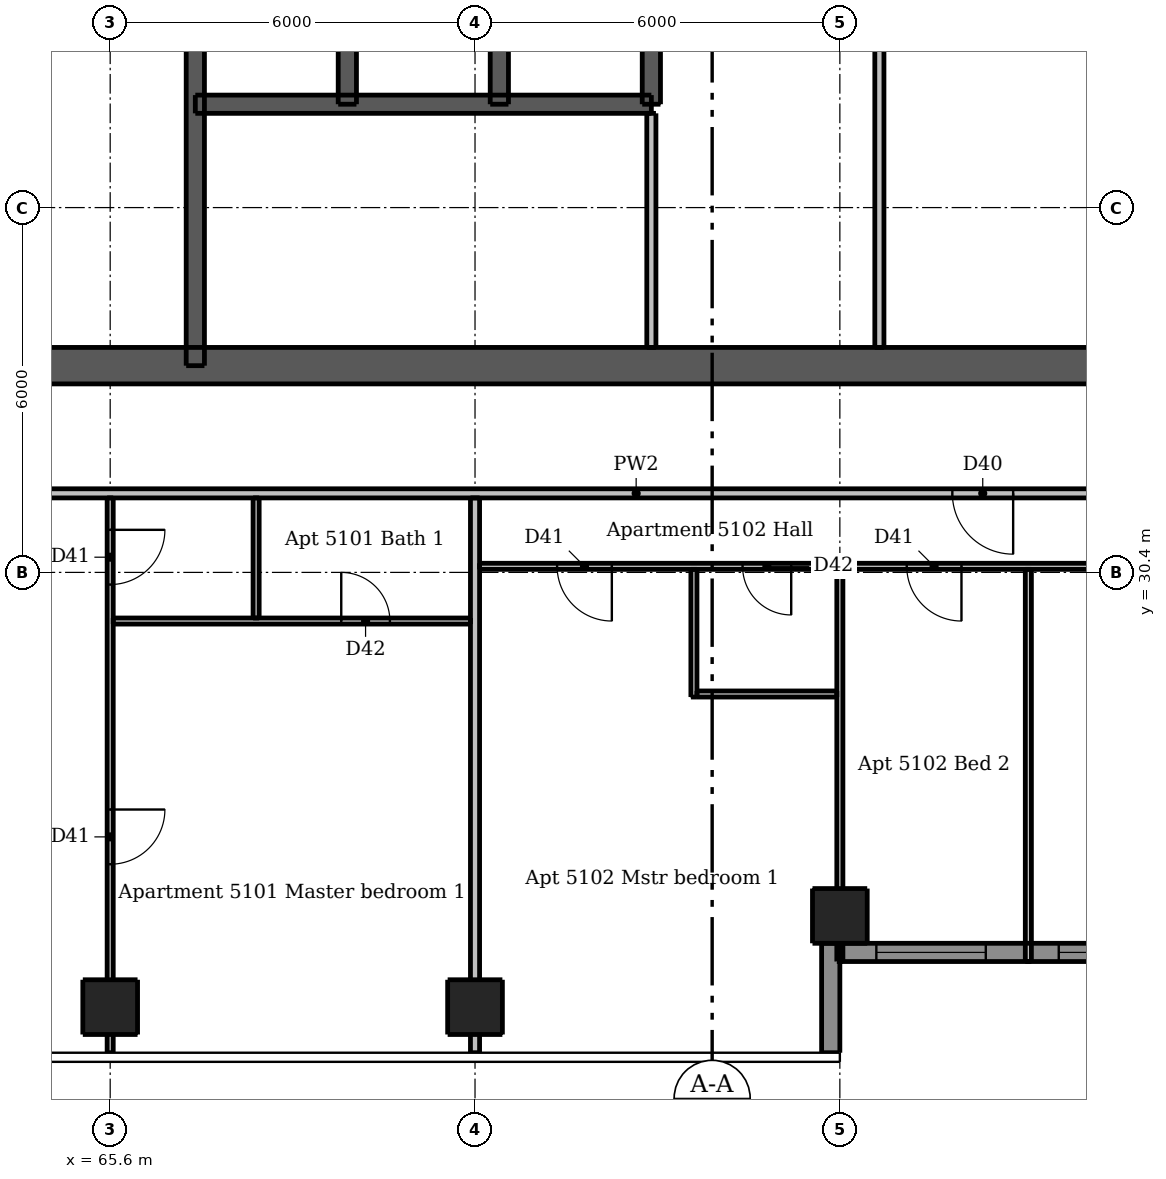
"""IFC4 building model, lengths in metres.
Left out: names, types, materials, properties, quantities, classifications, styles, units other than length and angle.
Written with IfcOpenShell. Run it as: python <this file> out.ifc"""

import sys

from ifc_helpers import new_model, si_unit, direction, frame, frame_2d, origin, origin_2d, place, context, subcontext, project, spatial, rectangle, extrude, element, fill, save


model = new_model("IFC4")
c1 = context("Model", 3, precision=1e-05, world=origin(), true_north=direction((0.0, 1.0)))
c2 = subcontext(c1, "Body", "Model", "MODEL_VIEW")
j1 = project(units=[si_unit("LENGTHUNIT", "METRE"), si_unit("PLANEANGLEUNIT", "RADIAN")], contexts=[c1])
p1 = place(None, origin())
s1 = spatial("IfcSite", under=j1, at=p1, CompositionType="ELEMENT")
p2 = place(p1, origin())
s2 = spatial("IfcBuilding", under=s1, at=p2, CompositionType="ELEMENT")
p3 = place(p2, frame((0.0, 0.0, 193.6)))
s3 = spatial("IfcBuildingStorey", under=s2, at=p3, CompositionType="ELEMENT", Elevation=193.6)
p4 = place(p3, frame((62.5, 33.8, 0.0), z_axis=(0.0, 0.0, 1.0), x_axis=(1.0, 0.0, 0.0)))
e1 = element("IfcWall", 1, at=p4, inside=s3, PredefinedType="SHEAR", context=c2, shape_type="SweptSolid", body=[
    extrude(rectangle(XDim=24.0, YDim=0.6, at=frame_2d((12.0, 0.0))), origin(), (0.0, 0.0, 1.0), 3.05),
])
p5 = place(p4, frame((1.925, 0.0, 0.0)))
e2 = element("IfcOpeningElement", 2, at=p5, cuts=e1, PredefinedType="OPENING", context=c2, shape_type="SweptSolid", body=[
    extrude(rectangle(XDim=1.1, YDim=2.1, at=frame_2d((0.55, 1.05))), frame((0.0, 0.31, 0.0), z_axis=(0.0, -1.0, 0.0), x_axis=(1.0, 0.0, 0.0)), (0.0, 0.0, 1.0), 0.62),
])
p6 = place(p4, frame((20.975, 0.0, 0.0)))
e3 = element("IfcOpeningElement", 3, at=p6, cuts=e1, PredefinedType="OPENING", context=c2, shape_type="SweptSolid", body=[
    extrude(rectangle(XDim=1.1, YDim=2.1, at=frame_2d((0.55, 1.05))), frame((0.0, 0.31, 0.0), z_axis=(0.0, -1.0, 0.0), x_axis=(1.0, 0.0, 0.0)), (0.0, 0.0, 1.0), 0.62),
])
p7 = place(p4, frame((8.0, 0.0, 0.0)))
e4 = element("IfcOpeningElement", 4, at=p7, cuts=e1, PredefinedType="OPENING", context=c2, shape_type="SweptSolid", body=[
    extrude(rectangle(XDim=1.1, YDim=2.1, at=frame_2d((0.55, 1.05))), frame((0.0, 0.31, 0.0), z_axis=(0.0, -1.0, 0.0), x_axis=(1.0, 0.0, 0.0)), (0.0, 0.0, 1.0), 0.62),
])
p8 = place(p4, frame((13.5, 0.0, 0.0)))
e5 = element("IfcOpeningElement", 5, at=p8, cuts=e1, PredefinedType="OPENING", context=c2, shape_type="SweptSolid", body=[
    extrude(rectangle(XDim=0.9, YDim=2.1, at=frame_2d((0.45, 1.05))), frame((0.0, 0.31, 0.0), z_axis=(0.0, -1.0, 0.0), x_axis=(1.0, 0.0, 0.0)), (0.0, 0.0, 1.0), 0.62),
])
p9 = place(p4, frame((17.1, 0.0, 0.0)))
e6 = element("IfcOpeningElement", 6, at=p9, cuts=e1, PredefinedType="OPENING", context=c2, shape_type="SweptSolid", body=[
    extrude(rectangle(XDim=0.9, YDim=2.1, at=frame_2d((0.45, 1.05))), frame((0.0, 0.31, 0.0), z_axis=(0.0, -1.0, 0.0), x_axis=(1.0, 0.0, 0.0)), (0.0, 0.0, 1.0), 0.62),
])
p10 = place(p3, frame((67.0, 33.8, 0.0), z_axis=(0.0, 0.0, 1.0), x_axis=(0.0, 1.0, 0.0)))
e7 = element("IfcWall", 7, at=p10, inside=s3, PredefinedType="SHEAR", context=c2, shape_type="SweptSolid", body=[
    extrude(rectangle(XDim=10.1, YDim=0.3, at=frame_2d((5.05, 0.0))), origin(), (0.0, 0.0, 1.0), 3.05),
])
p11 = place(p10, frame((0.5, 0.0, 0.0)))
e8 = element("IfcOpeningElement", 8, at=p11, cuts=e7, PredefinedType="OPENING", context=c2, shape_type="SweptSolid", body=[
    extrude(rectangle(XDim=1.1, YDim=2.1, at=frame_2d((0.55, 1.05))), frame((0.0, 0.16, 0.0), z_axis=(0.0, -1.0, 0.0), x_axis=(1.0, 0.0, 0.0)), (0.0, 0.0, 1.0), 0.32),
])
p12 = place(p3, frame((67.0, 38.1, 0.0), z_axis=(0.0, 0.0, 1.0), x_axis=(1.0, 0.0, 0.0)))
e9 = element("IfcWall", 9, at=p12, inside=s3, PredefinedType="SHEAR", context=c2, shape_type="SweptSolid", body=[
    extrude(rectangle(XDim=7.5, YDim=0.3, at=frame_2d((3.75, 0.0))), origin(), (0.0, 0.0, 1.0), 3.05),
])
p13 = place(p12, frame((0.7, 0.0, 0.0)))
e10 = element("IfcOpeningElement", 10, at=p13, cuts=e9, PredefinedType="OPENING", context=c2, shape_type="SweptSolid", body=[
    extrude(rectangle(XDim=1.1, YDim=2.1, at=frame_2d((0.55, 1.05))), frame((0.0, 0.16, 0.0), z_axis=(0.0, -1.0, 0.0), x_axis=(1.0, 0.0, 0.0)), (0.0, 0.0, 1.0), 0.32),
])
p14 = place(p12, frame((3.2, 0.0, 0.0)))
e11 = element("IfcOpeningElement", 11, at=p14, cuts=e9, PredefinedType="OPENING", context=c2, shape_type="SweptSolid", body=[
    extrude(rectangle(XDim=1.1, YDim=2.1, at=frame_2d((0.55, 1.05))), frame((0.0, 0.16, 0.0), z_axis=(0.0, -1.0, 0.0), x_axis=(1.0, 0.0, 0.0)), (0.0, 0.0, 1.0), 0.32),
])
p15 = place(p12, frame((5.65, 0.0, 0.0)))
e12 = element("IfcOpeningElement", 12, at=p15, cuts=e9, PredefinedType="OPENING", context=c2, shape_type="SweptSolid", body=[
    extrude(rectangle(XDim=1.2, YDim=2.1, at=frame_2d((0.6, 1.05))), frame((0.0, 0.16, 0.0), z_axis=(0.0, -1.0, 0.0), x_axis=(1.0, 0.0, 0.0)), (0.0, 0.0, 1.0), 0.32),
])
for number, where, z_axis, x_axis in (
    (13, (69.5, 38.1, 0.0), (0.0, 0.0, 1.0), (0.0, 1.0, 0.0)),
    (14, (72.0, 38.1, 0.0), (0.0, 0.0, 1.0), (0.0, 1.0, 0.0)),
    (15, (74.5, 38.1, 0.0), (0.0, 0.0, 1.0), (0.0, 1.0, 0.0)),
):
    element("IfcWall", number, at=place(p3, frame(where, z_axis=z_axis, x_axis=x_axis)), inside=s3, PredefinedType="SHEAR", context=c2, shape_type="SweptSolid", body=[
        extrude(rectangle(XDim=2.9, YDim=0.3, at=frame_2d((1.45, 0.0))), origin(), (0.0, 0.0, 1.0), 3.05),
    ])
for number, where, z_axis, x_axis in (
    (16, (65.6, 23.25, 0.0), (0.0, 0.0, 1.0), (1.0, 0.0, 0.0)),
    (17, (71.6, 23.25, 0.0), (0.0, 0.0, 1.0), (1.0, 0.0, 0.0)),
    (18, (77.6, 24.75, 0.0), (0.0, 0.0, 1.0), (1.0, 0.0, 0.0)),
):
    element("IfcColumn", number, at=place(p3, frame(where, z_axis=z_axis, x_axis=x_axis)), inside=s3, PredefinedType="COLUMN", context=c2, shape_type="SweptSolid", body=[
        extrude(rectangle(XDim=0.9, YDim=0.9, at=origin_2d()), origin(), (0.0, 0.0, 1.0), 3.05),
    ])
p16 = place(p3, frame((77.45, 22.5, 0.0), z_axis=(0.0, 0.0, 1.0), x_axis=(0.0, 1.0, 0.0)))
e19 = element("IfcWall", 19, at=p16, inside=s3, PredefinedType="SOLIDWALL", context=c2, shape_type="SweptSolid", body=[
    extrude(rectangle(XDim=1.8, YDim=0.3, at=frame_2d((0.9, 0.0))), origin(), (0.0, 0.0, 1.0), 3.05),
])
p17 = place(p3, frame((77.6, 24.15, 0.0), z_axis=(0.0, 0.0, 1.0), x_axis=(1.0, 0.0, 0.0)))
e20 = element("IfcWall", 20, at=p17, inside=s3, PredefinedType="SOLIDWALL", context=c2, shape_type="SweptSolid", body=[
    extrude(rectangle(XDim=5.7, YDim=0.3, at=frame_2d((2.85, 0.0))), origin(), (0.0, 0.0, 1.0), 3.05),
])
p18 = place(p17, frame((0.6, 0.0, 0.15)))
e21 = element("IfcOpeningElement", 21, at=p18, cuts=e20, PredefinedType="OPENING", context=c2, shape_type="SweptSolid", body=[
    extrude(rectangle(XDim=1.8, YDim=2.1, at=frame_2d((0.9, 1.05))), frame((0.0, 0.16, 0.0), z_axis=(0.0, -1.0, 0.0), x_axis=(1.0, 0.0, 0.0)), (0.0, 0.0, 1.0), 0.32),
])
p19 = place(p17, frame((3.6, 0.0, 0.15)))
e22 = element("IfcOpeningElement", 22, at=p19, cuts=e20, PredefinedType="OPENING", context=c2, shape_type="SweptSolid", body=[
    extrude(rectangle(XDim=1.8, YDim=2.1, at=frame_2d((0.9, 1.05))), frame((0.0, 0.16, 0.0), z_axis=(0.0, -1.0, 0.0), x_axis=(1.0, 0.0, 0.0)), (0.0, 0.0, 1.0), 0.32),
])
p20 = place(p3, frame((74.5, 34.1, 0.0), z_axis=(0.0, 0.0, 1.0), x_axis=(0.0, 1.0, 0.0)))
e23 = element("IfcWall", 23, at=p20, inside=s3, PredefinedType="PLUMBINGWALL", context=c2, shape_type="SweptSolid", body=[
    extrude(rectangle(XDim=3.85, YDim=0.15, at=frame_2d((1.925, 0.0))), origin(), (0.0, 0.0, 1.0), 3.05),
])
p21 = place(p3, frame((78.25, 34.1, 0.0), z_axis=(0.0, 0.0, 1.0), x_axis=(0.0, 1.0, 0.0)))
e24 = element("IfcWall", 24, at=p21, inside=s3, PredefinedType="PLUMBINGWALL", context=c2, shape_type="SweptSolid", body=[
    extrude(rectangle(XDim=6.75, YDim=0.15, at=frame_2d((3.375, 0.0))), origin(), (0.0, 0.0, 1.0), 3.05),
])
p22 = place(p3, frame((65.6, 31.625, 0.0), z_axis=(0.0, 0.0, 1.0), x_axis=(0.0, -1.0, 0.0)))
e25 = element("IfcWall", 25, at=p22, inside=s3, PredefinedType="PARTITIONING", context=c2, shape_type="SweptSolid", body=[
    extrude(rectangle(XDim=9.125, YDim=0.1, at=frame_2d((4.562, 0.0))), origin(), (0.0, 0.0, 1.0), 2.516),
])
p23 = place(p22, frame((0.525, 0.0, 0.0)))
e26 = element("IfcOpeningElement", 26, at=p23, cuts=e25, PredefinedType="OPENING", context=c2, shape_type="SweptSolid", body=[
    extrude(rectangle(XDim=0.9, YDim=2.1, at=frame_2d((0.45, 1.05))), frame((0.0, 0.06, 0.0), z_axis=(0.0, -1.0, 0.0), x_axis=(1.0, 0.0, 0.0)), (0.0, 0.0, 1.0), 0.12),
])
p24 = place(p22, frame((5.125, 0.0, 0.0)))
e27 = element("IfcOpeningElement", 27, at=p24, cuts=e25, PredefinedType="OPENING", context=c2, shape_type="SweptSolid", body=[
    extrude(rectangle(XDim=0.9, YDim=2.1, at=frame_2d((0.45, 1.05))), frame((0.0, 0.06, 0.0), z_axis=(0.0, -1.0, 0.0), x_axis=(1.0, 0.0, 0.0)), (0.0, 0.0, 1.0), 0.12),
])
p25 = place(p3, frame((68.0, 29.65, 0.0), z_axis=(0.0, 0.0, 1.0), x_axis=(0.0, 1.0, 0.0)))
e28 = element("IfcWall", 28, at=p25, inside=s3, PredefinedType="PARTITIONING", context=c2, shape_type="SweptSolid", body=[
    extrude(rectangle(XDim=1.975, YDim=0.1, at=frame_2d((0.988, 0.0))), origin(), (0.0, 0.0, 1.0), 3.05),
])
p26 = place(p3, frame((75.2, 28.35, 0.0), z_axis=(0.0, 0.0, 1.0), x_axis=(0.0, 1.0, 0.0)))
e29 = element("IfcWall", 29, at=p26, inside=s3, PredefinedType="PARTITIONING", context=c2, shape_type="SweptSolid", body=[
    extrude(rectangle(XDim=2.1, YDim=0.1, at=frame_2d((1.05, 0.0))), origin(), (0.0, 0.0, 1.0), 3.05),
])
p27 = place(p3, frame((77.6, 24.0, 0.0), z_axis=(0.0, 0.0, 1.0), x_axis=(0.0, 1.0, 0.0)))
e30 = element("IfcWall", 30, at=p27, inside=s3, PredefinedType="PARTITIONING", context=c2, shape_type="SweptSolid", body=[
    extrude(rectangle(XDim=6.45, YDim=0.1, at=frame_2d((3.225, 0.0))), origin(), (0.0, 0.0, 1.0), 2.59),
])
p28 = place(p3, frame((80.7, 24.0, 0.0), z_axis=(0.0, 0.0, 1.0), x_axis=(0.0, 1.0, 0.0)))
e31 = element("IfcWall", 31, at=p28, inside=s3, PredefinedType="PARTITIONING", context=c2, shape_type="SweptSolid", body=[
    extrude(rectangle(XDim=6.45, YDim=0.1, at=frame_2d((3.225, 0.0))), origin(), (0.0, 0.0, 1.0), 3.05),
])
p29 = place(p3, frame((88.25, 30.5, 0.0), z_axis=(0.0, 0.0, 1.0), x_axis=(-1.0, 0.0, 0.0)))
e32 = element("IfcWall", 32, at=p29, inside=s3, PredefinedType="PARTITIONING", context=c2, shape_type="SweptSolid", body=[
    extrude(rectangle(XDim=16.575, YDim=0.1, at=frame_2d((8.288, 0.0))), origin(), (0.0, 0.0, 1.0), 3.05),
])
p30 = place(p29, frame((4.15, 0.0, 0.0)))
e33 = element("IfcOpeningElement", 33, at=p30, cuts=e32, PredefinedType="OPENING", context=c2, shape_type="SweptSolid", body=[
    extrude(rectangle(XDim=0.9, YDim=2.1, at=frame_2d((0.45, 1.05))), frame((0.0, 0.06, 0.0), z_axis=(0.0, -1.0, 0.0), x_axis=(1.0, 0.0, 0.0)), (0.0, 0.0, 1.0), 0.12),
])
p31 = place(p29, frame((0.35, 0.0, 0.0)))
e34 = element("IfcOpeningElement", 34, at=p31, cuts=e32, PredefinedType="OPENING", context=c2, shape_type="SweptSolid", body=[
    extrude(rectangle(XDim=0.9, YDim=2.1, at=frame_2d((0.45, 1.05))), frame((0.0, 0.06, 0.0), z_axis=(0.0, -1.0, 0.0), x_axis=(1.0, 0.0, 0.0)), (0.0, 0.0, 1.0), 0.12),
])
p32 = place(p29, frame((14.4, 0.0, 0.0)))
e35 = element("IfcOpeningElement", 35, at=p32, cuts=e32, PredefinedType="OPENING", context=c2, shape_type="SweptSolid", body=[
    extrude(rectangle(XDim=0.9, YDim=2.1, at=frame_2d((0.45, 1.05))), frame((0.0, 0.06, 0.0), z_axis=(0.0, -1.0, 0.0), x_axis=(1.0, 0.0, 0.0)), (0.0, 0.0, 1.0), 0.12),
])
p33 = place(p29, frame((8.65, 0.0, 0.0)))
e36 = element("IfcOpeningElement", 36, at=p33, cuts=e32, PredefinedType="OPENING", context=c2, shape_type="SweptSolid", body=[
    extrude(rectangle(XDim=0.9, YDim=2.1, at=frame_2d((0.45, 1.05))), frame((0.0, 0.06, 0.0), z_axis=(0.0, -1.0, 0.0), x_axis=(1.0, 0.0, 0.0)), (0.0, 0.0, 1.0), 0.12),
])
p34 = place(p29, frame((11.45, 0.0, 0.0)))
e37 = element("IfcOpeningElement", 37, at=p34, cuts=e32, PredefinedType="OPENING", context=c2, shape_type="SweptSolid", body=[
    extrude(rectangle(XDim=0.8, YDim=2.1, at=frame_2d((0.4, 1.05))), frame((0.0, 0.06, 0.0), z_axis=(0.0, -1.0, 0.0), x_axis=(1.0, 0.0, 0.0)), (0.0, 0.0, 1.0), 0.12),
])
p35 = place(p3, frame((65.65, 29.6, 0.0), z_axis=(0.0, 0.0, 1.0), x_axis=(1.0, 0.0, 0.0)))
e38 = element("IfcWall", 38, at=p35, inside=s3, PredefinedType="PARTITIONING", context=c2, shape_type="SweptSolid", body=[
    extrude(rectangle(XDim=5.875, YDim=0.1, at=frame_2d((2.938, 0.0))), origin(), (0.0, 0.0, 1.0), 3.05),
])
p36 = place(p35, frame((3.75, 0.0, 0.0)))
e39 = element("IfcOpeningElement", 39, at=p36, cuts=e38, PredefinedType="OPENING", context=c2, shape_type="SweptSolid", body=[
    extrude(rectangle(XDim=0.8, YDim=2.1, at=frame_2d((0.4, 1.05))), frame((0.0, 0.06, 0.0), z_axis=(0.0, -1.0, 0.0), x_axis=(1.0, 0.0, 0.0)), (0.0, 0.0, 1.0), 0.12),
])
p37 = place(p3, frame((75.25, 28.4, 0.0), z_axis=(0.0, 0.0, 1.0), x_axis=(1.0, 0.0, 0.0)))
e40 = element("IfcWall", 40, at=p37, inside=s3, PredefinedType="PARTITIONING", context=c2, shape_type="SweptSolid", body=[
    extrude(rectangle(XDim=2.3, YDim=0.1, at=frame_2d((1.15, 0.0))), origin(), (0.0, 0.0, 1.0), 3.05),
])
p38 = place(p3, frame((71.6, 22.5, 0.0), z_axis=(0.0, 0.0, 1.0), x_axis=(0.0, 1.0, 0.0)))
e41 = element("IfcWall", 41, at=p38, inside=s3, PredefinedType="PARTITIONING", context=c2, shape_type="SweptSolid", body=[
    extrude(rectangle(XDim=9.125, YDim=0.15, at=frame_2d((4.562, 0.0))), origin(), (0.0, 0.0, 1.0), 2.516),
])
p39 = place(p3, frame((89.525, 31.7, 0.0), z_axis=(0.0, 0.0, 1.0), x_axis=(-1.0, 0.0, 0.0)))
e42 = element("IfcWall", 42, at=p39, inside=s3, PredefinedType="PARTITIONING", context=c2, shape_type="SweptSolid", body=[
    extrude(rectangle(XDim=30.55, YDim=0.15, at=frame_2d((15.275, 0.0))), origin(), (0.0, 0.0, 1.0), 3.05),
])
p40 = place(p39, frame((26.775, 0.0, 0.0)))
e43 = element("IfcOpeningElement", 43, at=p40, cuts=e42, PredefinedType="OPENING", context=c2, shape_type="SweptSolid", body=[
    extrude(rectangle(XDim=1.0, YDim=2.1, at=frame_2d((0.5, 1.05))), frame((0.0, 0.085, 0.0), z_axis=(0.0, -1.0, 0.0), x_axis=(1.0, 0.0, 0.0)), (0.0, 0.0, 1.0), 0.17),
])
p41 = place(p39, frame((9.075, 0.0, 0.0)))
e44 = element("IfcOpeningElement", 44, at=p41, cuts=e42, PredefinedType="OPENING", context=c2, shape_type="SweptSolid", body=[
    extrude(rectangle(XDim=1.0, YDim=2.1, at=frame_2d((0.5, 1.05))), frame((0.0, 0.085, 0.0), z_axis=(0.0, -1.0, 0.0), x_axis=(1.0, 0.0, 0.0)), (0.0, 0.0, 1.0), 0.17),
])
p42 = place(p18, origin())
e45 = element("IfcWindow", 45, at=p42, inside=s3, PartitioningType="DOUBLE_PANEL_VERTICAL", PredefinedType="WINDOW", context=c2, shape_type="SweptSolid", body=[
    extrude(rectangle(XDim=1.8, YDim=2.1, at=frame_2d((0.9, 1.05))), frame((0.0, 0.03, 0.0), z_axis=(0.0, -1.0, 0.0), x_axis=(1.0, 0.0, 0.0)), (0.0, 0.0, 1.0), 0.06),
])
fill(e21, e45)
p43 = place(p19, origin())
e46 = element("IfcWindow", 46, at=p43, inside=s3, PartitioningType="DOUBLE_PANEL_VERTICAL", PredefinedType="WINDOW", context=c2, shape_type="SweptSolid", body=[
    extrude(rectangle(XDim=1.8, YDim=2.1, at=frame_2d((0.9, 1.05))), frame((0.0, 0.03, 0.0), z_axis=(0.0, -1.0, 0.0), x_axis=(1.0, 0.0, 0.0)), (0.0, 0.0, 1.0), 0.06),
])
fill(e22, e46)
p44 = place(p5, origin())
e47 = element("IfcDoor", 47, at=p44, inside=s3, OperationType="SINGLE_SWING_LEFT", PredefinedType="DOOR", context=c2, shape_type="SweptSolid", body=[
    extrude(rectangle(XDim=1.1, YDim=2.1, at=frame_2d((0.55, 1.05))), frame((0.0, 0.288, 0.0), z_axis=(0.0, -1.0, 0.0), x_axis=(1.0, 0.0, 0.0)), (0.0, 0.0, 1.0), 0.05),
])
fill(e2, e47)
p45 = place(p7, origin())
e48 = element("IfcDoor", 48, at=p45, inside=s3, OperationType="SINGLE_SWING_LEFT", PredefinedType="DOOR", context=c2, shape_type="SweptSolid", body=[
    extrude(rectangle(XDim=1.1, YDim=2.1, at=frame_2d((0.55, 1.05))), frame((0.0, 0.288, 0.0), z_axis=(0.0, -1.0, 0.0), x_axis=(1.0, 0.0, 0.0)), (0.0, 0.0, 1.0), 0.05),
])
fill(e4, e48)
p46 = place(p11, origin())
e49 = element("IfcDoor", 49, at=p46, inside=s3, OperationType="SINGLE_SWING_RIGHT", PredefinedType="DOOR", context=c2, shape_type="SweptSolid", body=[
    extrude(rectangle(XDim=1.1, YDim=2.1, at=frame_2d((0.55, 1.05))), frame((0.0, -0.087, 0.0), z_axis=(0.0, -1.0, 0.0), x_axis=(1.0, 0.0, 0.0)), (0.0, 0.0, 1.0), 0.05),
])
fill(e8, e49)
p47 = place(p8, origin())
e50 = element("IfcDoor", 50, at=p47, inside=s3, OperationType="SINGLE_SWING_LEFT", PredefinedType="DOOR", context=c2, shape_type="SweptSolid", body=[
    extrude(rectangle(XDim=0.9, YDim=2.1, at=frame_2d((0.45, 1.05))), frame((0.0, 0.288, 0.0), z_axis=(0.0, -1.0, 0.0), x_axis=(1.0, 0.0, 0.0)), (0.0, 0.0, 1.0), 0.05),
])
fill(e5, e50)
p48 = place(p9, origin())
e51 = element("IfcDoor", 51, at=p48, inside=s3, OperationType="SINGLE_SWING_LEFT", PredefinedType="DOOR", context=c2, shape_type="SweptSolid", body=[
    extrude(rectangle(XDim=0.9, YDim=2.1, at=frame_2d((0.45, 1.05))), frame((0.0, 0.288, 0.0), z_axis=(0.0, -1.0, 0.0), x_axis=(1.0, 0.0, 0.0)), (0.0, 0.0, 1.0), 0.05),
])
fill(e6, e51)
p49 = place(p13, origin())
e52 = element("IfcDoor", 52, at=p49, inside=s3, OperationType="DOUBLE_DOOR_SLIDING", PredefinedType="DOOR", context=c2, shape_type="SweptSolid", body=[
    extrude(rectangle(XDim=1.1, YDim=2.1, at=frame_2d((0.55, 1.05))), frame((0.0, 0.025, 0.0), z_axis=(0.0, -1.0, 0.0), x_axis=(1.0, 0.0, 0.0)), (0.0, 0.0, 1.0), 0.05),
])
fill(e10, e52)
p50 = place(p14, origin())
e53 = element("IfcDoor", 53, at=p50, inside=s3, OperationType="DOUBLE_DOOR_SLIDING", PredefinedType="DOOR", context=c2, shape_type="SweptSolid", body=[
    extrude(rectangle(XDim=1.1, YDim=2.1, at=frame_2d((0.55, 1.05))), frame((0.0, 0.025, 0.0), z_axis=(0.0, -1.0, 0.0), x_axis=(1.0, 0.0, 0.0)), (0.0, 0.0, 1.0), 0.05),
])
fill(e11, e53)
p51 = place(p15, origin())
e54 = element("IfcDoor", 54, at=p51, inside=s3, OperationType="DOUBLE_DOOR_SLIDING", PredefinedType="DOOR", context=c2, shape_type="SweptSolid", body=[
    extrude(rectangle(XDim=1.2, YDim=2.1, at=frame_2d((0.6, 1.05))), frame((0.0, 0.025, 0.0), z_axis=(0.0, -1.0, 0.0), x_axis=(1.0, 0.0, 0.0)), (0.0, 0.0, 1.0), 0.05),
])
fill(e12, e54)
p52 = place(p23, origin())
e55 = element("IfcDoor", 55, at=p52, inside=s3, OperationType="SINGLE_SWING_LEFT", PredefinedType="DOOR", context=c2, shape_type="SweptSolid", body=[
    extrude(rectangle(XDim=0.9, YDim=2.1, at=frame_2d((0.45, 1.05))), frame((0.0, 0.025, 0.0), z_axis=(0.0, -1.0, 0.0), x_axis=(1.0, 0.0, 0.0)), (0.0, 0.0, 1.0), 0.05),
])
fill(e26, e55)
p53 = place(p24, origin())
e56 = element("IfcDoor", 56, at=p53, inside=s3, OperationType="SINGLE_SWING_LEFT", PredefinedType="DOOR", context=c2, shape_type="SweptSolid", body=[
    extrude(rectangle(XDim=0.9, YDim=2.1, at=frame_2d((0.45, 1.05))), frame((0.0, 0.025, 0.0), z_axis=(0.0, -1.0, 0.0), x_axis=(1.0, 0.0, 0.0)), (0.0, 0.0, 1.0), 0.05),
])
fill(e27, e56)
p54 = place(p36, origin())
e57 = element("IfcDoor", 57, at=p54, inside=s3, OperationType="SINGLE_SWING_LEFT", PredefinedType="DOOR", context=c2, shape_type="SweptSolid", body=[
    extrude(rectangle(XDim=0.8, YDim=2.1, at=frame_2d((0.4, 1.05))), frame((0.0, 0.025, 0.0), z_axis=(0.0, -1.0, 0.0), x_axis=(1.0, 0.0, 0.0)), (0.0, 0.0, 1.0), 0.05),
])
fill(e39, e57)
p55 = place(p41, origin())
e58 = element("IfcDoor", 58, at=p55, inside=s3, OperationType="SINGLE_SWING_LEFT", PredefinedType="DOOR", context=c2, shape_type="SweptSolid", body=[
    extrude(rectangle(XDim=1.0, YDim=2.1, at=frame_2d((0.5, 1.05))), frame((0.0, 0.025, 0.0), z_axis=(0.0, -1.0, 0.0), x_axis=(1.0, 0.0, 0.0)), (0.0, 0.0, 1.0), 0.05),
])
fill(e44, e58)
p56 = place(p32, origin())
e59 = element("IfcDoor", 59, at=p56, inside=s3, OperationType="SINGLE_SWING_LEFT", PredefinedType="DOOR", context=c2, shape_type="SweptSolid", body=[
    extrude(rectangle(XDim=0.9, YDim=2.1, at=frame_2d((0.45, 1.05))), frame((0.0, 0.025, 0.0), z_axis=(0.0, -1.0, 0.0), x_axis=(1.0, 0.0, 0.0)), (0.0, 0.0, 1.0), 0.05),
])
fill(e35, e59)
p57 = place(p33, origin())
e60 = element("IfcDoor", 60, at=p57, inside=s3, OperationType="SINGLE_SWING_LEFT", PredefinedType="DOOR", context=c2, shape_type="SweptSolid", body=[
    extrude(rectangle(XDim=0.9, YDim=2.1, at=frame_2d((0.45, 1.05))), frame((0.0, 0.025, 0.0), z_axis=(0.0, -1.0, 0.0), x_axis=(1.0, 0.0, 0.0)), (0.0, 0.0, 1.0), 0.05),
])
fill(e36, e60)
p58 = place(p34, origin())
e61 = element("IfcDoor", 61, at=p58, inside=s3, OperationType="SINGLE_SWING_LEFT", PredefinedType="DOOR", context=c2, shape_type="SweptSolid", body=[
    extrude(rectangle(XDim=0.8, YDim=2.1, at=frame_2d((0.4, 1.05))), frame((0.0, 0.025, 0.0), z_axis=(0.0, -1.0, 0.0), x_axis=(1.0, 0.0, 0.0)), (0.0, 0.0, 1.0), 0.05),
])
fill(e37, e61)
save(model, sys.argv[1])
